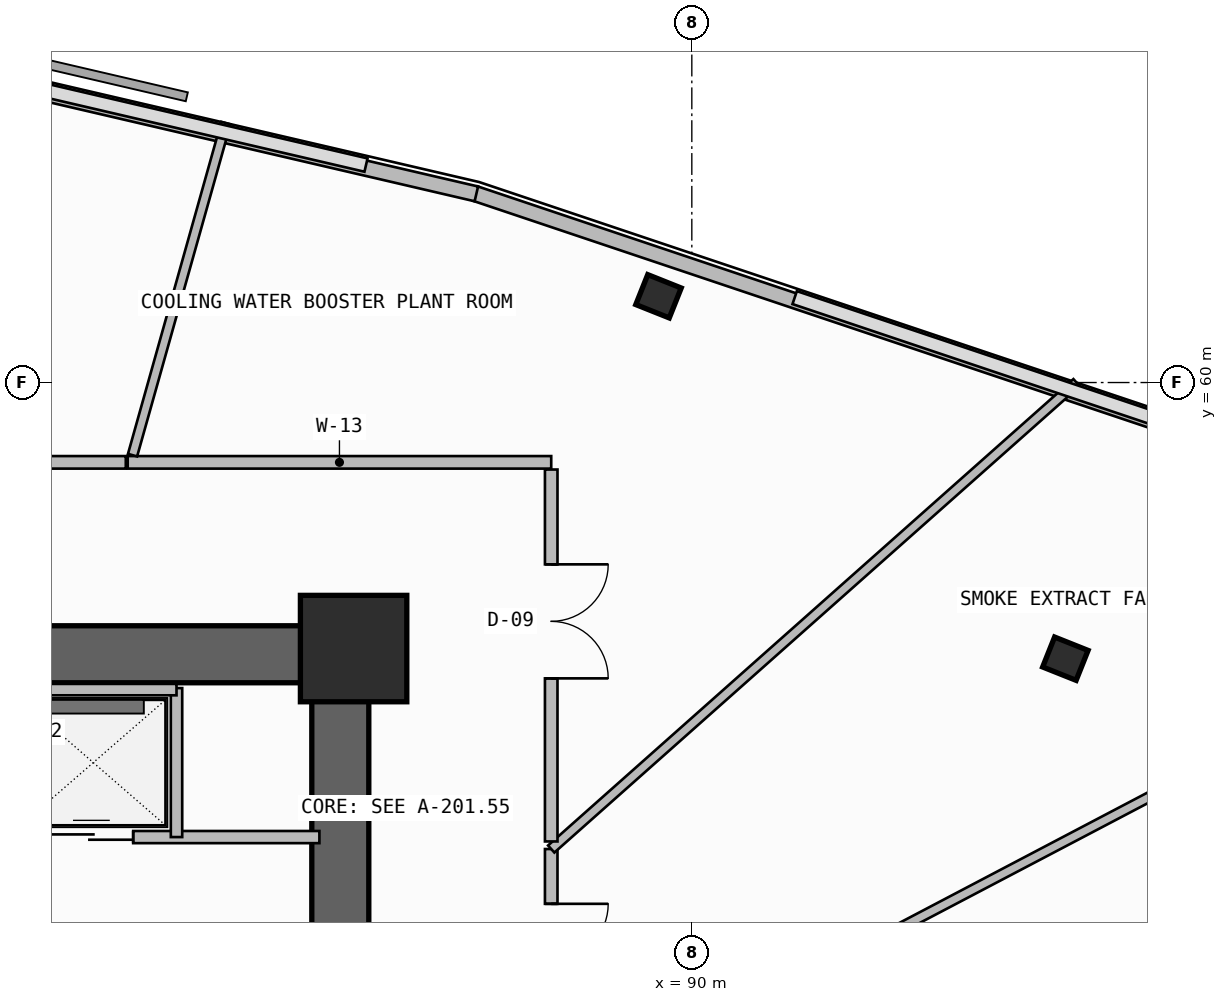
"""IFC4 building model, lengths in metres.
Left out: names, types, materials, properties, quantities, classifications, styles, units other than length and angle.
Written with IfcOpenShell. Run it as: python <this file> out.ifc"""

import sys

from ifc_helpers import new_model, si_unit, direction, frame, frame_2d, origin, origin_2d, place, context, subcontext, project, spatial, rectangle, i_section, extrude, element, fill, save


model = new_model("IFC4")
c1 = context("Model", 3, precision=1e-05, world=origin(), true_north=direction((0.0, 1.0)))
c2 = subcontext(c1, "Body", "Model", "MODEL_VIEW")
j1 = project(units=[si_unit("LENGTHUNIT", "METRE"), si_unit("PLANEANGLEUNIT", "RADIAN")], contexts=[c1])
p1 = place(None, origin())
s1 = spatial("IfcSite", under=j1, at=p1, CompositionType="ELEMENT")
p2 = place(p1, origin())
s2 = spatial("IfcBuilding", under=s1, at=p2, CompositionType="ELEMENT")
p3 = place(p2, frame((0.0, 0.0, 196.7)))
s3 = spatial("IfcBuildingStorey", under=s2, at=p3, CompositionType="ELEMENT", Elevation=196.7)
p4 = place(p3, frame((72.0, 56.425, -0.5), z_axis=(0.0, 0.0, 1.0), x_axis=(1.0, 0.0, 0.0)))
e1 = element("IfcWall", 1, at=p4, inside=s3, PredefinedType="SHEAR", context=c2, shape_type="SweptSolid", body=[
    extrude(rectangle(XDim=13.75, YDim=0.75, at=frame_2d((6.875, 0.0))), origin(), (0.0, 0.0, 1.0), 4.3),
])
p5 = place(p3, frame((85.375, 47.6, -0.5), z_axis=(0.0, 0.0, 1.0), x_axis=(0.0, 1.0, 0.0)))
e2 = element("IfcWall", 2, at=p5, inside=s3, PredefinedType="SHEAR", context=c2, shape_type="SweptSolid", body=[
    extrude(rectangle(XDim=8.45, YDim=0.75, at=frame_2d((4.225, 0.0))), origin(), (0.0, 0.0, 1.0), 4.3),
])
p6 = place(p3, frame((85.55, 56.5, 0.0), z_axis=(0.0, 0.0, 1.0), x_axis=(1.0, 0.0, 0.0)))
e3 = element("IfcColumn", 3, at=p6, inside=s3, PredefinedType="COLUMN", context=c2, shape_type="SweptSolid", body=[
    extrude(rectangle(XDim=1.4, YDim=1.4, at=origin_2d()), origin(), (0.0, 0.0, 1.0), 4.2),
])
for number, where, z_axis, x_axis in (
    (4, (94.915, 56.367, 0.0), (0.0, 0.0, 1.0), (0.371, 0.929, 0.0)),
    (5, (89.562, 61.135, 0.0), (0.0, 0.0, 1.0), (0.371, 0.929, 0.0)),
):
    element("IfcColumn", number, at=place(p3, frame(where, z_axis=z_axis, x_axis=x_axis)), inside=s3, PredefinedType="COLUMN", context=c2, shape_type="SweptSolid", body=[
        extrude(i_section(OverallWidth=0.424, OverallDepth=0.474, WebThickness=0.048, FlangeThickness=0.077, FilletRadius=0.015, at=origin_2d()), origin(), (0.0, 0.0, 1.0), 4.2),
    ])
p7 = place(p3, frame((117.363, 52.344, 0.0), z_axis=(0.0, 0.0, 1.0), x_axis=(-0.94800468727, 0.31825636351, 0.0)))
e6 = element("IfcWall", 6, at=p7, inside=s3, PredefinedType="PARAPET", context=c2, shape_type="SweptSolid", body=[
    extrude(rectangle(XDim=31.869, YDim=0.2, at=frame_2d((15.935, 0.0))), origin(), (0.0, 0.0, 1.0), 1.15),
])
p8 = place(p3, frame((87.165, 62.482, 0.0), z_axis=(0.0, 0.0, 1.0), x_axis=(-0.973958867717, 0.226724775876, 0.0)))
e7 = element("IfcWall", 7, at=p8, inside=s3, PredefinedType="PARAPET", context=c2, shape_type="SweptSolid", body=[
    extrude(rectangle(XDim=31.892, YDim=0.2, at=frame_2d((15.946, 0.0))), origin(), (0.0, 0.0, 1.0), 1.15),
])
p9 = place(p3, frame((73.02, 54.02, 0.0), z_axis=(0.0, 0.0, 1.0), x_axis=(1.0, 0.0, 0.0)))
e8 = element("IfcWall", 8, at=p9, inside=s3, PredefinedType="SOLIDWALL", context=c2, shape_type="SweptSolid", body=[
    extrude(rectangle(XDim=12.08, YDim=0.16, at=frame_2d((6.04, 0.0))), origin(), (0.0, 0.0, 1.0), 3.8),
])
p10 = place(p9, frame((4.03, 0.0, 0.0)))
e9 = element("IfcOpeningElement", 9, at=p10, cuts=e8, PredefinedType="OPENING", context=c2, shape_type="SweptSolid", body=[
    extrude(rectangle(XDim=1.1, YDim=2.25, at=frame_2d((0.55, 1.125))), frame((0.0, 0.09, 0.0), z_axis=(0.0, -1.0, 0.0), x_axis=(1.0, 0.0, 0.0)), (0.0, 0.0, 1.0), 0.18),
])
p11 = place(p9, frame((6.28, 0.0, 0.0)))
e10 = element("IfcOpeningElement", 10, at=p11, cuts=e8, PredefinedType="OPENING", context=c2, shape_type="SweptSolid", body=[
    extrude(rectangle(XDim=1.1, YDim=2.25, at=frame_2d((0.55, 1.125))), frame((0.0, 0.09, 0.0), z_axis=(0.0, -1.0, 0.0), x_axis=(1.0, 0.0, 0.0)), (0.0, 0.0, 1.0), 0.18),
])
p12 = place(p9, frame((8.53, 0.0, 0.0)))
e11 = element("IfcOpeningElement", 11, at=p12, cuts=e8, PredefinedType="OPENING", context=c2, shape_type="SweptSolid", body=[
    extrude(rectangle(XDim=1.1, YDim=2.25, at=frame_2d((0.55, 1.125))), frame((0.0, 0.09, 0.0), z_axis=(0.0, -1.0, 0.0), x_axis=(1.0, 0.0, 0.0)), (0.0, 0.0, 1.0), 0.18),
])
p13 = place(p3, frame((83.22, 54.02, 0.0), z_axis=(0.0, 0.0, 1.0), x_axis=(0.0, 1.0, 0.0)))
e12 = element("IfcWall", 12, at=p13, inside=s3, PredefinedType="SOLIDWALL", context=c2, shape_type="SweptSolid", body=[
    extrude(rectangle(XDim=1.96, YDim=0.15, at=frame_2d((0.98, 0.0))), origin(), (0.0, 0.0, 1.0), 3.8),
])
p14 = place(p3, frame((76.52, 55.96, 0.0), z_axis=(0.0, 0.0, 1.0), x_axis=(1.0, 0.0, 0.0)))
e13 = element("IfcWall", 13, at=p14, inside=s3, PredefinedType="SOLIDWALL", context=c2, shape_type="SweptSolid", body=[
    extrude(rectangle(XDim=6.7, YDim=0.15, at=frame_2d((3.35, 0.0))), origin(), (0.0, 0.0, 1.0), 3.8),
])
p15 = place(p3, frame((88.213, 50.447, 0.0), z_axis=(0.0, 0.0, 1.0), x_axis=(0.885317432513, 0.464987143574, 0.0)))
e14 = element("IfcWall", 14, at=p15, inside=s3, PredefinedType="PARTITIONING", context=c2, shape_type="SweptSolid", body=[
    extrude(rectangle(XDim=15.548, YDim=0.125, at=frame_2d((7.774, 0.0))), origin(), (0.0, 0.0, 1.0), 2.777),
])
p16 = place(p3, frame((88.15, 50.474, 0.0), z_axis=(0.0, 0.0, 1.0), x_axis=(0.0, 1.0, 0.0)))
e15 = element("IfcWall", 15, at=p16, inside=s3, PredefinedType="PARTITIONING", context=c2, shape_type="SweptSolid", body=[
    extrude(rectangle(XDim=3.388, YDim=0.165, at=frame_2d((1.694, 0.0))), origin(), (0.0, 0.0, 1.0), 3.8),
])
p17 = place(p16, frame((1.167, 0.0, 0.0)))
e16 = element("IfcOpeningElement", 16, at=p17, cuts=e15, PredefinedType="OPENING", context=c2, shape_type="SweptSolid", body=[
    extrude(rectangle(XDim=1.5, YDim=2.25, at=frame_2d((0.75, 1.125))), frame((0.0, 0.093, 0.0), z_axis=(0.0, -1.0, 0.0), x_axis=(1.0, 0.0, 0.0)), (0.0, 0.0, 1.0), 0.185),
])
p18 = place(p3, frame((88.15, 53.863, 0.0), z_axis=(0.0, 0.0, 1.0), x_axis=(0.747844904677, 0.66387348083, 0.0)))
e17 = element("IfcWall", 17, at=p18, inside=s3, PredefinedType="PARTITIONING", context=c2, shape_type="SweptSolid", body=[
    extrude(rectangle(XDim=9.243, YDim=0.125, at=frame_2d((4.621, 0.0))), origin(), (0.0, 0.0, 1.0), 2.777),
])
p19 = place(p3, frame((88.15, 58.95, 0.0), z_axis=(0.0, 0.0, 1.0), x_axis=(-1.0, 0.0, 0.0)))
e18 = element("IfcWall", 18, at=p19, inside=s3, PredefinedType="PARTITIONING", context=c2, shape_type="SweptSolid", body=[
    extrude(rectangle(XDim=5.572, YDim=0.165, at=frame_2d((2.786, 0.0))), origin(), (0.0, 0.0, 1.0), 2.777),
])
p20 = place(p3, frame((88.15, 53.962, 0.0), z_axis=(0.0, 0.0, 1.0), x_axis=(0.0, 1.0, 0.0)))
e19 = element("IfcWall", 19, at=p20, inside=s3, PredefinedType="PARTITIONING", context=c2, shape_type="SweptSolid", body=[
    extrude(rectangle(XDim=4.893, YDim=0.165, at=frame_2d((2.447, 0.0))), origin(), (0.0, 0.0, 1.0), 2.777),
])
p21 = place(p20, frame((2.146, 0.0, 0.0)))
e20 = element("IfcOpeningElement", 20, at=p21, cuts=e19, PredefinedType="OPENING", context=c2, shape_type="SweptSolid", body=[
    extrude(rectangle(XDim=1.5, YDim=2.25, at=frame_2d((0.75, 1.125))), frame((0.0, 0.093, 0.0), z_axis=(0.0, -1.0, 0.0), x_axis=(1.0, 0.0, 0.0)), (0.0, 0.0, 1.0), 0.185),
])
p22 = place(p3, frame((82.642, 59.044, 0.0), z_axis=(0.0, 0.0, 1.0), x_axis=(0.270597571844, 0.962692554304, 0.0)))
e21 = element("IfcWall", 21, at=p22, inside=s3, PredefinedType="PARTITIONING", context=c2, shape_type="SweptSolid", body=[
    extrude(rectangle(XDim=4.538, YDim=0.125, at=frame_2d((2.269, 0.0))), origin(), (0.0, 0.0, 1.0), 3.8),
])
p23 = place(p3, frame((82.552, 58.95, 0.0), z_axis=(0.0, 0.0, 1.0), x_axis=(-1.0, 0.0, 0.0)))
e22 = element("IfcWall", 22, at=p23, inside=s3, PredefinedType="PARTITIONING", context=c2, shape_type="SweptSolid", body=[
    extrude(rectangle(XDim=7.816, YDim=0.165, at=frame_2d((3.908, 0.0))), origin(), (0.0, 0.0, 1.0), 3.8),
])
p24 = place(p23, frame((3.158, 0.0, 0.0)))
e23 = element("IfcOpeningElement", 23, at=p24, cuts=e22, PredefinedType="OPENING", context=c2, shape_type="SweptSolid", body=[
    extrude(rectangle(XDim=1.5, YDim=2.25, at=frame_2d((0.75, 1.125))), frame((0.0, 0.093, 0.0), z_axis=(0.0, -1.0, 0.0), x_axis=(1.0, 0.0, 0.0)), (0.0, 0.0, 1.0), 0.185),
])
p25 = place(p12, origin())
e24 = element("IfcDoor", 24, at=p25, inside=s3, OperationType="DOUBLE_DOOR_SLIDING", PredefinedType="DOOR", context=c2, shape_type="SweptSolid", body=[
    extrude(rectangle(XDim=1.1, YDim=2.25, at=frame_2d((0.55, 1.125))), frame((0.0, 0.025, 0.0), z_axis=(0.0, -1.0, 0.0), x_axis=(1.0, 0.0, 0.0)), (0.0, 0.0, 1.0), 0.05),
])
fill(e11, e24)
p26 = place(p17, frame((1.5, 0.0, 0.0), z_axis=(0.0, 0.0, 1.0), x_axis=(-1.0, 0.0, 0.0)))
e25 = element("IfcDoor", 25, at=p26, inside=s3, OperationType="DOUBLE_DOOR_SINGLE_SWING", PredefinedType="DOOR", context=c2, shape_type="SweptSolid", body=[
    extrude(rectangle(XDim=1.5, YDim=2.25, at=frame_2d((0.75, 1.125))), frame((0.0, 0.025, 0.0), z_axis=(0.0, -1.0, 0.0), x_axis=(1.0, 0.0, 0.0)), (0.0, 0.0, 1.0), 0.05),
])
fill(e16, e25)
p27 = place(p21, frame((1.5, 0.0, 0.0), z_axis=(0.0, 0.0, 1.0), x_axis=(-1.0, 0.0, 0.0)))
e26 = element("IfcDoor", 26, at=p27, inside=s3, OperationType="DOUBLE_DOOR_SINGLE_SWING", PredefinedType="DOOR", context=c2, shape_type="SweptSolid", body=[
    extrude(rectangle(XDim=1.5, YDim=2.25, at=frame_2d((0.75, 1.125))), frame((0.0, 0.025, 0.0), z_axis=(0.0, -1.0, 0.0), x_axis=(1.0, 0.0, 0.0)), (0.0, 0.0, 1.0), 0.05),
])
fill(e20, e26)
save(model, sys.argv[1])
